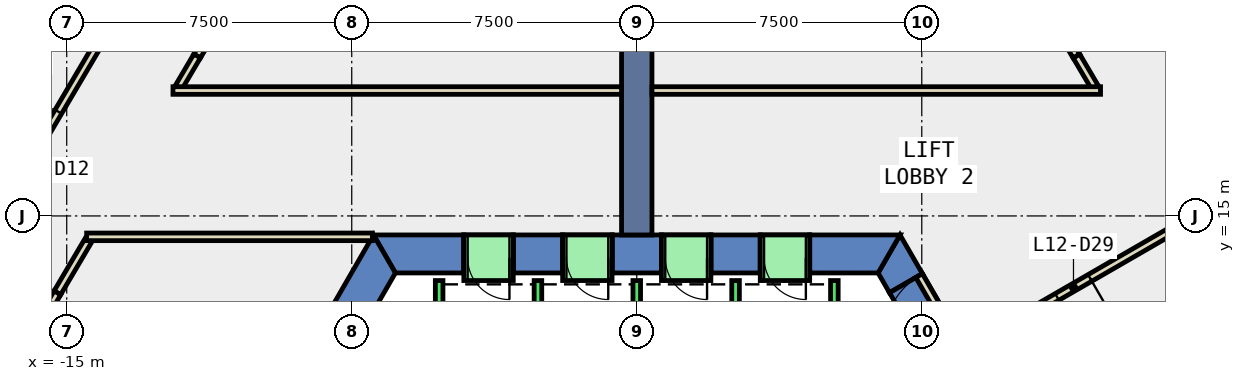
"""IFC4 building model, lengths in metres.
Left out: names, types, materials, properties, quantities, classifications, styles, units other than length and angle.
Written with IfcOpenShell. Run it as: python <this file> out.ifc"""

import sys

from ifc_helpers import new_model, si_unit, direction, frame, frame_2d, origin, place, context, subcontext, project, spatial, polyline, rectangle, outline, extrude, element, fill, save


model = new_model("IFC4")
c1 = context("Model", 3, precision=1e-05, world=origin(), true_north=direction((0.0, 1.0)))
c2 = subcontext(c1, "Body", "Model", "MODEL_VIEW")
j1 = project(units=[si_unit("LENGTHUNIT", "METRE"), si_unit("PLANEANGLEUNIT", "RADIAN")], contexts=[c1])
p1 = place(None, origin())
s1 = spatial("IfcSite", under=j1, at=p1, CompositionType="ELEMENT")
p2 = place(p1, origin())
s2 = spatial("IfcBuilding", under=s1, at=p2, CompositionType="ELEMENT")
p3 = place(p2, frame((0.0, 0.0, 60.2)))
s3 = spatial("IfcBuildingStorey", under=s2, at=p3, CompositionType="ELEMENT", Elevation=60.2)
p4 = place(p3, frame((0.0, 0.0, -0.4)))
e1 = element("IfcWall", 1, at=p4, inside=s3, PredefinedType="SHEAR", context=c2, shape_type="SweptSolid", body=[
    extrude(outline(polyline([(6.651, 12.98), (7.517, 13.48), (6.928, 14.5), (6.351, 13.5), (6.651, 12.98)])), origin(), (0.0, 0.0, 1.0), 4.2),
])
p5 = place(p3, frame((0.0, 0.0, 3.6)))
e2 = element("IfcWall", 2, at=p5, inside=s3, PredefinedType="SHEAR", context=c2, shape_type="SweptSolid", body=[
    extrude(outline(polyline([(7.517, 13.48), (6.651, 12.98), (7.651, 11.248), (8.517, 11.748), (7.517, 13.48)])), origin(), (0.0, 0.0, 1.0), 0.2),
])
p6 = place(p3, frame((0.0, 0.0, -0.4)))
e3 = element("IfcWall", 3, at=p6, inside=s3, PredefinedType="SHEAR", context=c2, shape_type="SweptSolid", body=[
    extrude(outline(polyline([(4.55, 14.5), (4.55, 13.5), (6.351, 13.5), (6.928, 14.5), (4.55, 14.5)])), origin(), (0.0, 0.0, 1.0), 4.2),
])
p7 = place(p3, frame((0.0, 0.0, -0.4)))
e4 = element("IfcWall", 4, at=p7, inside=s3, PredefinedType="SHEAR", context=c2, shape_type="SweptSolid", body=[
    extrude(outline(polyline([(1.95, 14.5), (1.95, 13.5), (3.25, 13.5), (3.25, 14.5), (1.95, 14.5)])), origin(), (0.0, 0.0, 1.0), 4.2),
])
p8 = place(p3, frame((0.0, 0.0, -0.4)))
e5 = element("IfcWall", 5, at=p8, inside=s3, PredefinedType="SHEAR", context=c2, shape_type="SweptSolid", body=[
    extrude(outline(polyline([(-0.65, 14.5), (-0.65, 13.5), (0.65, 13.5), (0.65, 14.5), (-0.65, 14.5)])), origin(), (0.0, 0.0, 1.0), 4.2),
])
p9 = place(p3, frame((0.0, 0.0, -0.4)))
e6 = element("IfcWall", 6, at=p9, inside=s3, PredefinedType="SHEAR", context=c2, shape_type="SweptSolid", body=[
    extrude(outline(polyline([(-3.25, 14.5), (-3.25, 13.5), (-1.95, 13.5), (-1.95, 14.5), (-3.25, 14.5)])), origin(), (0.0, 0.0, 1.0), 4.2),
])
p10 = place(p3, frame((0.0, 0.0, -0.4)))
e7 = element("IfcWall", 7, at=p10, inside=s3, PredefinedType="SHEAR", context=c2, shape_type="SweptSolid", body=[
    extrude(outline(polyline([(-4.55, 13.5), (-4.55, 14.5), (-6.928, 14.5), (-6.351, 13.5), (-4.55, 13.5)])), origin(), (0.0, 0.0, 1.0), 4.2),
])
p11 = place(p3, frame((0.0, 0.0, 3.6)))
e8 = element("IfcWall", 8, at=p11, inside=s3, PredefinedType="SHEAR", context=c2, shape_type="SweptSolid", body=[
    extrude(outline(polyline([(3.25, 14.5), (3.25, 13.5), (4.55, 13.5), (4.55, 14.5), (3.25, 14.5)])), origin(), (0.0, 0.0, 1.0), 0.2),
])
p12 = place(p3, frame((0.0, 0.0, 3.6)))
e9 = element("IfcWall", 9, at=p12, inside=s3, PredefinedType="SHEAR", context=c2, shape_type="SweptSolid", body=[
    extrude(outline(polyline([(0.65, 14.5), (0.65, 13.5), (1.95, 13.5), (1.95, 14.5), (0.65, 14.5)])), origin(), (0.0, 0.0, 1.0), 0.2),
])
p13 = place(p3, frame((0.0, 0.0, 3.6)))
e10 = element("IfcWall", 10, at=p13, inside=s3, PredefinedType="SHEAR", context=c2, shape_type="SweptSolid", body=[
    extrude(outline(polyline([(-1.95, 14.5), (-1.95, 13.5), (-0.65, 13.5), (-0.65, 14.5), (-1.95, 14.5)])), origin(), (0.0, 0.0, 1.0), 0.2),
])
p14 = place(p3, frame((0.0, 0.0, 3.6)))
e11 = element("IfcWall", 11, at=p14, inside=s3, PredefinedType="SHEAR", context=c2, shape_type="SweptSolid", body=[
    extrude(outline(polyline([(-4.55, 14.5), (-4.55, 13.5), (-3.25, 13.5), (-3.25, 14.5), (-4.55, 14.5)])), origin(), (0.0, 0.0, 1.0), 0.2),
])
p15 = place(p3, frame((0.0, 0.0, -0.4)))
e12 = element("IfcWall", 12, at=p15, inside=s3, PredefinedType="SHEAR", context=c2, shape_type="SweptSolid", body=[
    extrude(outline(polyline([(-12.267, 5.252), (-11.402, 4.752), (-6.351, 13.5), (-6.928, 14.5), (-12.267, 5.252)])), origin(), (0.0, 0.0, 1.0), 4.2),
])
p16 = place(p3, frame((0.0, 14.5, -0.4), z_axis=(0.0, 0.0, 1.0), x_axis=(0.0, 1.0, 0.0)))
e13 = element("IfcWall", 13, at=p16, inside=s3, PredefinedType="SHEAR", context=c2, shape_type="SweptSolid", body=[
    extrude(rectangle(XDim=9.0, YDim=0.8, at=frame_2d((4.5, 0.0))), origin(), (0.0, 0.0, 1.0), 4.2),
])
p17 = place(p3, frame((-14.427, 14.364, 0.0), z_axis=(0.0, 0.0, 1.0), x_axis=(-0.508509719672, -0.861056249614, 0.0)))
e14 = element("IfcWall", 14, at=p17, inside=s3, PredefinedType="PARTITIONING", context=c2, shape_type="SweptSolid", body=[
    extrude(rectangle(XDim=1.611, YDim=0.2, at=frame_2d((0.805, 0.0))), origin(), (0.0, 0.0, 1.0), 3.8),
])
p18 = place(p3, frame((-15.246, 12.977, 0.0), z_axis=(0.0, 0.0, 1.0), x_axis=(-0.499891203561, -0.866088208327, 0.0)))
e15 = element("IfcWall", 15, at=p18, inside=s3, PredefinedType="PARTITIONING", context=c2, shape_type="SweptSolid", body=[
    extrude(rectangle(XDim=4.801, YDim=0.2, at=frame_2d((2.4, 0.0))), origin(), (0.0, 0.0, 1.0), 3.8),
])
p19 = place(p3, frame((14.316, 14.75, 0.0), z_axis=(0.0, 0.0, 1.0), x_axis=(-0.865981716183, -0.500075661512, 0.0)))
e16 = element("IfcWall", 16, at=p19, inside=s3, PredefinedType="PARTITIONING", context=c2, shape_type="SweptSolid", body=[
    extrude(rectangle(XDim=6.023, YDim=0.2, at=frame_2d((3.011, 0.0))), origin(), (0.0, 0.0, 1.0), 3.8),
])
p20 = place(p19, frame((2.761, 0.0, 0.0)))
e17 = element("IfcOpeningElement", 17, at=p20, cuts=e16, PredefinedType="OPENING", context=c2, shape_type="SweptSolid", body=[
    extrude(rectangle(XDim=1.0, YDim=2.1, at=frame_2d((0.5, 1.05))), frame((0.0, 0.11, 0.0), z_axis=(0.0, -1.0, 0.0), x_axis=(1.0, 0.0, 0.0)), (0.0, 0.0, 1.0), 0.22),
])
p21 = place(p3, frame((12.054, 18.386, 0.0), z_axis=(0.0, 0.0, 1.0), x_axis=(-0.508048285953, 0.861328589529, 0.0)))
e18 = element("IfcWall", 18, at=p21, inside=s3, PredefinedType="PARTITIONING", context=c2, shape_type="SweptSolid", body=[
    extrude(rectangle(XDim=0.954, YDim=0.2, at=frame_2d((0.477, 0.0))), origin(), (0.0, 0.0, 1.0), 3.8),
])
p22 = place(p3, frame((11.569, 19.208, 0.0), z_axis=(0.0, 0.0, 1.0), x_axis=(-0.516172233954, 0.85648480716, 0.0)))
e19 = element("IfcWall", 19, at=p22, inside=s3, PredefinedType="PARTITIONING", context=c2, shape_type="SweptSolid", body=[
    extrude(rectangle(XDim=7.234, YDim=0.2, at=frame_2d((3.617, 0.0))), origin(), (0.0, 0.0, 1.0), 3.8),
])
p23 = place(p22, frame((2.717, 0.0, 0.0)))
e20 = element("IfcOpeningElement", 20, at=p23, cuts=e19, PredefinedType="OPENING", context=c2, shape_type="SweptSolid", body=[
    extrude(rectangle(XDim=1.8, YDim=2.1, at=frame_2d((0.9, 1.05))), frame((0.0, 0.11, 0.0), z_axis=(0.0, -1.0, 0.0), x_axis=(1.0, 0.0, 0.0)), (0.0, 0.0, 1.0), 0.22),
])
p24 = place(p3, frame((-7.835, 25.404, 0.0), z_axis=(0.0, 0.0, 1.0), x_axis=(-0.516172233954, -0.85648480716, 0.0)))
e21 = element("IfcWall", 21, at=p24, inside=s3, PredefinedType="PARTITIONING", context=c2, shape_type="SweptSolid", body=[
    extrude(rectangle(XDim=7.234, YDim=0.2, at=frame_2d((3.617, 0.0))), origin(), (0.0, 0.0, 1.0), 3.8),
])
p25 = place(p3, frame((-11.569, 19.208, 0.0), z_axis=(0.0, 0.0, 1.0), x_axis=(-0.508048285953, -0.861328589529, 0.0)))
e22 = element("IfcWall", 22, at=p25, inside=s3, PredefinedType="PARTITIONING", context=c2, shape_type="SweptSolid", body=[
    extrude(rectangle(XDim=0.954, YDim=0.2, at=frame_2d((0.477, 0.0))), origin(), (0.0, 0.0, 1.0), 3.8),
])
p26 = place(p3, frame((13.63, 20.437, 0.0), z_axis=(0.0, 0.0, 1.0), x_axis=(0.508298695021, -0.861180838523, 0.0)))
e23 = element("IfcWall", 23, at=p26, inside=s3, PredefinedType="PARTITIONING", context=c2, shape_type="SweptSolid", body=[
    extrude(rectangle(XDim=3.553, YDim=0.2, at=frame_2d((1.777, 0.0))), origin(), (0.0, 0.0, 1.0), 3.8),
])
p27 = place(p3, frame((-17.357, 14.122, 0.0), z_axis=(0.0, 0.0, 1.0), x_axis=(0.508298575594, 0.861180909014, 0.0)))
e24 = element("IfcWall", 24, at=p27, inside=s3, PredefinedType="PARTITIONING", context=c2, shape_type="SweptSolid", body=[
    extrude(rectangle(XDim=7.258, YDim=0.2, at=frame_2d((3.629, 0.0))), origin(), (0.0, 0.0, 1.0), 3.8),
])
p28 = place(p27, frame((3.204, 0.0, 0.0)))
e25 = element("IfcOpeningElement", 25, at=p28, cuts=e24, PredefinedType="OPENING", context=c2, shape_type="SweptSolid", body=[
    extrude(rectangle(XDim=1.0, YDim=2.1, at=frame_2d((0.5, 1.05))), frame((0.0, 0.11, 0.0), z_axis=(0.0, -1.0, 0.0), x_axis=(1.0, 0.0, 0.0)), (0.0, 0.0, 1.0), 0.22),
])
p29 = place(p3, frame((-6.957, 14.45, 0.0), z_axis=(0.0, 0.0, 1.0), x_axis=(-1.0, 0.0, 0.0)))
e26 = element("IfcWall", 26, at=p29, inside=s3, PredefinedType="PARTITIONING", context=c2, shape_type="SweptSolid", body=[
    extrude(rectangle(XDim=7.519, YDim=0.2, at=frame_2d((3.76, 0.0))), origin(), (0.0, 0.0, 1.0), 3.8),
])
p30 = place(p3, frame((-12.204, 18.3, 0.0), z_axis=(0.0, 0.0, 1.0), x_axis=(1.0, 0.0, 0.0)))
e27 = element("IfcWall", 27, at=p30, inside=s3, PredefinedType="PARTITIONING", context=c2, shape_type="SweptSolid", body=[
    extrude(rectangle(XDim=11.804, YDim=0.2, at=frame_2d((5.902, 0.0))), origin(), (0.0, 0.0, 1.0), 3.8),
])
p31 = place(p3, frame((8.43, 11.698, 0.0), z_axis=(0.0, 0.0, 1.0), x_axis=(-0.50002537861, 0.866010750942, 0.0)))
e28 = element("IfcWall", 28, at=p31, inside=s3, PredefinedType="PARTITIONING", context=c2, shape_type="SweptSolid", body=[
    extrude(rectangle(XDim=2.0, YDim=0.2, at=frame_2d((1.0, 0.0))), origin(), (0.0, 0.0, 1.0), 2.4),
])
p32 = place(p31, frame((0.19, 0.0, 0.0)))
e29 = element("IfcOpeningElement", 29, at=p32, cuts=e28, PredefinedType="OPENING", context=c2, shape_type="SweptSolid", body=[
    extrude(rectangle(XDim=1.8, YDim=2.1, at=frame_2d((0.9, 1.05))), frame((0.0, 0.11, 0.0), z_axis=(0.0, -1.0, 0.0), x_axis=(1.0, 0.0, 0.0)), (0.0, 0.0, 1.0), 0.22),
])
p33 = place(p3, frame((0.4, 18.3, 0.0), z_axis=(0.0, 0.0, 1.0), x_axis=(1.0, 0.0, 0.0)))
e30 = element("IfcWall", 30, at=p33, inside=s3, PredefinedType="PARTITIONING", context=c2, shape_type="SweptSolid", body=[
    extrude(rectangle(XDim=11.804, YDim=0.2, at=frame_2d((5.902, 0.0))), origin(), (0.0, 0.0, 1.0), 3.8),
])
for number, where, z_axis, x_axis in (
    (31, (5.2, 10.8, 0.0), (0.0, 0.0, 1.0), (0.0, 1.0, 0.0)),
    (32, (2.6, 10.8, 0.0), (0.0, 0.0, 1.0), (0.0, 1.0, 0.0)),
    (33, (0.0, 10.8, 0.0), (0.0, 0.0, 1.0), (0.0, 1.0, 0.0)),
    (34, (-2.6, 10.8, 0.0), (0.0, 0.0, 1.0), (0.0, 1.0, 0.0)),
    (35, (-5.2, 10.8, 0.0), (0.0, 0.0, 1.0), (0.0, 1.0, 0.0)),
):
    element("IfcWall", number, at=place(p3, frame(where, z_axis=z_axis, x_axis=x_axis)), inside=s3, PredefinedType="STANDARD", context=c2, shape_type="SweptSolid", body=[
        extrude(rectangle(XDim=2.5, YDim=0.2, at=frame_2d((1.25, 0.0))), origin(), (0.0, 0.0, 1.0), 3.8),
    ])
p34 = place(p3, frame((4.55, 13.9, 0.0), z_axis=(0.0, 0.0, 1.0), x_axis=(-1.0, 0.0, 0.0)))
e36 = element("IfcWall", 36, at=p34, inside=s3, PredefinedType="STANDARD", context=c2, shape_type="SweptSolid", body=[
    extrude(rectangle(XDim=1.3, YDim=1.2, at=frame_2d((0.65, 0.0))), origin(), (0.0, 0.0, 1.0), 2.4),
])
p35 = place(p34, frame((0.1, 0.0, 0.0)))
e37 = element("IfcOpeningElement", 37, at=p35, cuts=e36, PredefinedType="OPENING", context=c2, shape_type="SweptSolid", body=[
    extrude(rectangle(XDim=1.1, YDim=2.3, at=frame_2d((0.55, 1.15))), frame((0.0, 0.61, 0.0), z_axis=(0.0, -1.0, 0.0), x_axis=(1.0, 0.0, 0.0)), (0.0, 0.0, 1.0), 1.22),
])
p36 = place(p3, frame((1.95, 13.9, 0.0), z_axis=(0.0, 0.0, 1.0), x_axis=(-1.0, 0.0, 0.0)))
e38 = element("IfcWall", 38, at=p36, inside=s3, PredefinedType="STANDARD", context=c2, shape_type="SweptSolid", body=[
    extrude(rectangle(XDim=1.3, YDim=1.2, at=frame_2d((0.65, 0.0))), origin(), (0.0, 0.0, 1.0), 2.4),
])
p37 = place(p36, frame((0.1, 0.0, 0.0)))
e39 = element("IfcOpeningElement", 39, at=p37, cuts=e38, PredefinedType="OPENING", context=c2, shape_type="SweptSolid", body=[
    extrude(rectangle(XDim=1.1, YDim=2.3, at=frame_2d((0.55, 1.15))), frame((0.0, 0.61, 0.0), z_axis=(0.0, -1.0, 0.0), x_axis=(1.0, 0.0, 0.0)), (0.0, 0.0, 1.0), 1.22),
])
p38 = place(p3, frame((-0.65, 13.9, 0.0), z_axis=(0.0, 0.0, 1.0), x_axis=(-1.0, 0.0, 0.0)))
e40 = element("IfcWall", 40, at=p38, inside=s3, PredefinedType="STANDARD", context=c2, shape_type="SweptSolid", body=[
    extrude(rectangle(XDim=1.3, YDim=1.2, at=frame_2d((0.65, 0.0))), origin(), (0.0, 0.0, 1.0), 2.4),
])
p39 = place(p38, frame((0.1, 0.0, 0.0)))
e41 = element("IfcOpeningElement", 41, at=p39, cuts=e40, PredefinedType="OPENING", context=c2, shape_type="SweptSolid", body=[
    extrude(rectangle(XDim=1.1, YDim=2.3, at=frame_2d((0.55, 1.15))), frame((0.0, 0.61, 0.0), z_axis=(0.0, -1.0, 0.0), x_axis=(1.0, 0.0, 0.0)), (0.0, 0.0, 1.0), 1.22),
])
p40 = place(p3, frame((-3.25, 13.9, 0.0), z_axis=(0.0, 0.0, 1.0), x_axis=(-1.0, 0.0, 0.0)))
e42 = element("IfcWall", 42, at=p40, inside=s3, PredefinedType="STANDARD", context=c2, shape_type="SweptSolid", body=[
    extrude(rectangle(XDim=1.3, YDim=1.2, at=frame_2d((0.65, 0.0))), origin(), (0.0, 0.0, 1.0), 2.4),
])
p41 = place(p40, frame((0.1, 0.0, 0.0)))
e43 = element("IfcOpeningElement", 43, at=p41, cuts=e42, PredefinedType="OPENING", context=c2, shape_type="SweptSolid", body=[
    extrude(rectangle(XDim=1.1, YDim=2.3, at=frame_2d((0.55, 1.15))), frame((0.0, 0.61, 0.0), z_axis=(0.0, -1.0, 0.0), x_axis=(1.0, 0.0, 0.0)), (0.0, 0.0, 1.0), 1.22),
])
p42 = place(p28, origin())
e44 = element("IfcDoor", 44, at=p42, inside=s3, OperationType="SINGLE_SWING_RIGHT", PredefinedType="DOOR", context=c2, shape_type="SweptSolid", body=[
    extrude(rectangle(XDim=1.0, YDim=2.1, at=frame_2d((0.5, 1.05))), frame((0.0, 0.025, 0.0), z_axis=(0.0, -1.0, 0.0), x_axis=(1.0, 0.0, 0.0)), (0.0, 0.0, 1.0), 0.05),
])
fill(e25, e44)
p43 = place(p20, origin())
e45 = element("IfcDoor", 45, at=p43, inside=s3, OperationType="SINGLE_SWING_LEFT", PredefinedType="DOOR", context=c2, shape_type="SweptSolid", body=[
    extrude(rectangle(XDim=1.0, YDim=2.1, at=frame_2d((0.5, 1.05))), frame((0.0, 0.025, 0.0), z_axis=(0.0, -1.0, 0.0), x_axis=(1.0, 0.0, 0.0)), (0.0, 0.0, 1.0), 0.05),
])
fill(e17, e45)
p44 = place(p32, origin())
e46 = element("IfcDoor", 46, at=p44, inside=s3, OperationType="DOUBLE_DOOR_SINGLE_SWING", PredefinedType="DOOR", context=c2, shape_type="SweptSolid", body=[
    extrude(rectangle(XDim=1.8, YDim=2.1, at=frame_2d((0.9, 1.05))), frame((0.0, 0.025, 0.0), z_axis=(0.0, -1.0, 0.0), x_axis=(1.0, 0.0, 0.0)), (0.0, 0.0, 1.0), 0.05),
])
fill(e29, e46)
p45 = place(p35, origin())
e47 = element("IfcDoor", 47, at=p45, inside=s3, OperationType="SLIDING_TO_LEFT", PredefinedType="DOOR", context=c2, shape_type="SweptSolid", body=[
    extrude(rectangle(XDim=1.1, YDim=2.3, at=frame_2d((0.55, 1.15))), frame((0.0, 0.025, 0.0), z_axis=(0.0, -1.0, 0.0), x_axis=(1.0, 0.0, 0.0)), (0.0, 0.0, 1.0), 0.05),
])
fill(e37, e47)
p46 = place(p37, origin())
e48 = element("IfcDoor", 48, at=p46, inside=s3, OperationType="SLIDING_TO_LEFT", PredefinedType="DOOR", context=c2, shape_type="SweptSolid", body=[
    extrude(rectangle(XDim=1.1, YDim=2.3, at=frame_2d((0.55, 1.15))), frame((0.0, 0.025, 0.0), z_axis=(0.0, -1.0, 0.0), x_axis=(1.0, 0.0, 0.0)), (0.0, 0.0, 1.0), 0.05),
])
fill(e39, e48)
p47 = place(p39, origin())
e49 = element("IfcDoor", 49, at=p47, inside=s3, OperationType="SLIDING_TO_LEFT", PredefinedType="DOOR", context=c2, shape_type="SweptSolid", body=[
    extrude(rectangle(XDim=1.1, YDim=2.3, at=frame_2d((0.55, 1.15))), frame((0.0, 0.025, 0.0), z_axis=(0.0, -1.0, 0.0), x_axis=(1.0, 0.0, 0.0)), (0.0, 0.0, 1.0), 0.05),
])
fill(e41, e49)
p48 = place(p41, origin())
e50 = element("IfcDoor", 50, at=p48, inside=s3, OperationType="SLIDING_TO_LEFT", PredefinedType="DOOR", context=c2, shape_type="SweptSolid", body=[
    extrude(rectangle(XDim=1.1, YDim=2.3, at=frame_2d((0.55, 1.15))), frame((0.0, 0.025, 0.0), z_axis=(0.0, -1.0, 0.0), x_axis=(1.0, 0.0, 0.0)), (0.0, 0.0, 1.0), 0.05),
])
fill(e43, e50)
save(model, sys.argv[1])
